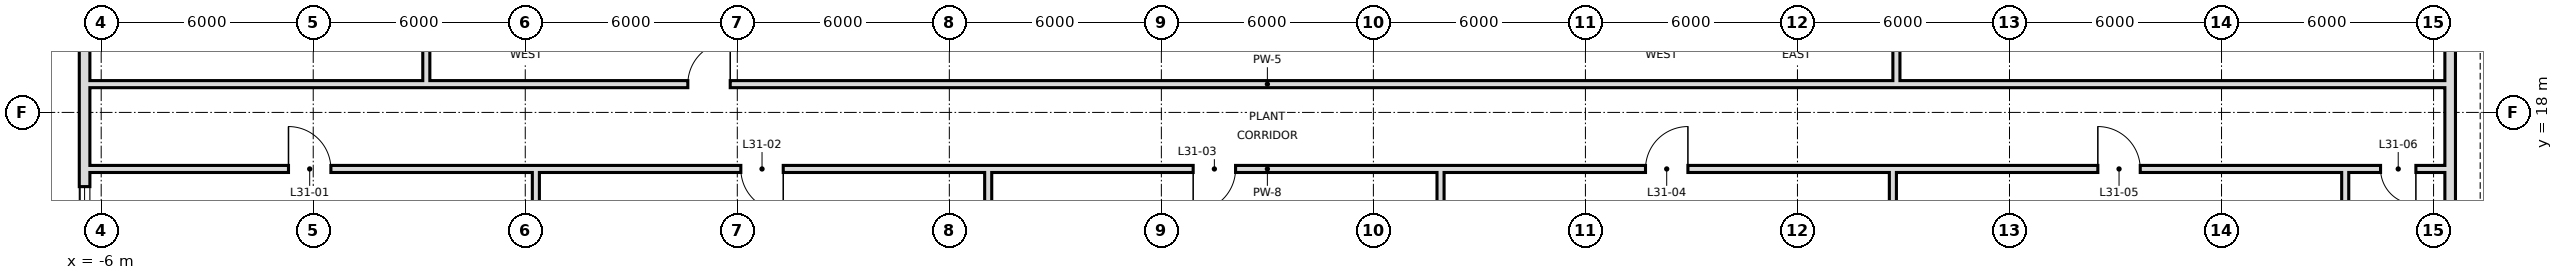
"""IFC4 building model, lengths in metres.
Left out: names, types, materials, properties, quantities, classifications, styles, units other than length and angle.
Written with IfcOpenShell. Run it as: python <this file> out.ifc"""

import sys

from ifc_helpers import new_model, si_unit, direction, frame, frame_2d, origin, place, context, subcontext, project, spatial, rectangle, extrude, element, fill, save


model = new_model("IFC4")
c1 = context("Model", 3, precision=1e-05, world=origin(), true_north=direction((0.0, 1.0)))
c2 = subcontext(c1, "Body", "Model", "MODEL_VIEW")
j1 = project(units=[si_unit("LENGTHUNIT", "METRE"), si_unit("PLANEANGLEUNIT", "RADIAN")], contexts=[c1])
p1 = place(None, origin())
s1 = spatial("IfcSite", under=j1, at=p1, CompositionType="ELEMENT")
p2 = place(p1, origin())
s2 = spatial("IfcBuilding", under=s1, at=p2, CompositionType="ELEMENT")
p3 = place(p2, frame((0.0, 0.0, 138.4)))
s3 = spatial("IfcBuildingStorey", under=s2, at=p3, CompositionType="ELEMENT", Elevation=138.4)
p4 = place(p3, frame((60.47, 5.805, 0.0), z_axis=(0.0, 0.0, 1.0), x_axis=(0.0, 1.0, 0.0)))
e1 = element("IfcWall", 1, at=p4, inside=s3, PredefinedType="SOLIDWALL", context=c2, shape_type="SweptSolid", body=[
    extrude(rectangle(XDim=36.389, YDim=0.3, at=frame_2d((18.195, 0.0))), origin(), (0.0, 0.0, 1.0), 5.22),
])
p5 = place(p4, frame((2.17, 0.0, 0.9)))
e2 = element("IfcOpeningElement", 2, at=p5, cuts=e1, PredefinedType="OPENING", context=c2, shape_type="SweptSolid", body=[
    extrude(rectangle(XDim=1.8, YDim=1.5, at=frame_2d((0.9, 0.75))), frame((0.0, 0.16, 0.0), z_axis=(0.0, -1.0, 0.0), x_axis=(1.0, 0.0, 0.0)), (0.0, 0.0, 1.0), 0.32),
])
p6 = place(p4, frame((14.295, 0.0, 0.9)))
e3 = element("IfcOpeningElement", 3, at=p6, cuts=e1, PredefinedType="OPENING", context=c2, shape_type="SweptSolid", body=[
    extrude(rectangle(XDim=1.8, YDim=1.5, at=frame_2d((0.9, 0.75))), frame((0.0, 0.16, 0.0), z_axis=(0.0, -1.0, 0.0), x_axis=(1.0, 0.0, 0.0)), (0.0, 0.0, 1.0), 0.32),
])
p7 = place(p4, frame((26.295, 0.0, 0.9)))
e4 = element("IfcOpeningElement", 4, at=p7, cuts=e1, PredefinedType="OPENING", context=c2, shape_type="SweptSolid", body=[
    extrude(rectangle(XDim=1.8, YDim=1.5, at=frame_2d((0.9, 0.75))), frame((0.0, 0.16, 0.0), z_axis=(0.0, -1.0, 0.0), x_axis=(1.0, 0.0, 0.0)), (0.0, 0.0, 1.0), 0.32),
])
p8 = place(p3, frame((-6.47, 42.195, 0.0), z_axis=(0.0, 0.0, 1.0), x_axis=(0.0, -1.0, 0.0)))
e5 = element("IfcWall", 5, at=p8, inside=s3, PredefinedType="SOLIDWALL", context=c2, shape_type="SweptSolid", body=[
    extrude(rectangle(XDim=36.389, YDim=0.3, at=frame_2d((18.195, 0.0))), origin(), (0.0, 0.0, 1.0), 5.22),
])
p9 = place(p8, frame((2.17, 0.0, 0.9)))
e6 = element("IfcOpeningElement", 6, at=p9, cuts=e5, PredefinedType="OPENING", context=c2, shape_type="SweptSolid", body=[
    extrude(rectangle(XDim=1.8, YDim=1.5, at=frame_2d((0.9, 0.75))), frame((0.0, 0.16, 0.0), z_axis=(0.0, -1.0, 0.0), x_axis=(1.0, 0.0, 0.0)), (0.0, 0.0, 1.0), 0.32),
])
p10 = place(p8, frame((14.295, 0.0, 0.9)))
e7 = element("IfcOpeningElement", 7, at=p10, cuts=e5, PredefinedType="OPENING", context=c2, shape_type="SweptSolid", body=[
    extrude(rectangle(XDim=1.8, YDim=1.5, at=frame_2d((0.9, 0.75))), frame((0.0, 0.16, 0.0), z_axis=(0.0, -1.0, 0.0), x_axis=(1.0, 0.0, 0.0)), (0.0, 0.0, 1.0), 0.32),
])
p11 = place(p8, frame((26.295, 0.0, 0.9)))
e8 = element("IfcOpeningElement", 8, at=p11, cuts=e5, PredefinedType="OPENING", context=c2, shape_type="SweptSolid", body=[
    extrude(rectangle(XDim=1.8, YDim=1.5, at=frame_2d((0.9, 0.75))), frame((0.0, 0.16, 0.0), z_axis=(0.0, -1.0, 0.0), x_axis=(1.0, 0.0, 0.0)), (0.0, 0.0, 1.0), 0.32),
])
p12 = place(p3, frame((3.2, 18.9, 0.0), z_axis=(0.0, 0.0, 1.0), x_axis=(0.0, 1.0, 0.0)))
e9 = element("IfcWall", 9, at=p12, inside=s3, PredefinedType="SOLIDWALL", context=c2, shape_type="SweptSolid", body=[
    extrude(rectangle(XDim=29.7, YDim=0.2, at=frame_2d((14.85, 0.0))), origin(), (0.0, 0.0, 1.0), 4.52),
])
p13 = place(p12, frame((18.3, 0.0, 0.0)))
e10 = element("IfcOpeningElement", 10, at=p13, cuts=e9, PredefinedType="OPENING", context=c2, shape_type="SweptSolid", body=[
    extrude(rectangle(XDim=1.2, YDim=2.4, at=frame_2d((0.6, 1.2))), frame((0.0, 0.11, 0.0), z_axis=(0.0, -1.0, 0.0), x_axis=(1.0, 0.0, 0.0)), (0.0, 0.0, 1.0), 0.22),
])
for number, where, z_axis, x_axis in (
    (11, (6.3, -0.6, 0.0), (0.0, 0.0, 1.0), (0.0, 1.0, 0.0)),
    (12, (19.1, -0.6, 0.0), (0.0, 0.0, 1.0), (0.0, 1.0, 0.0)),
    (13, (31.9, -0.6, 0.0), (0.0, 0.0, 1.0), (0.0, 1.0, 0.0)),
    (14, (44.7, -0.6, 0.0), (0.0, 0.0, 1.0), (0.0, 1.0, 0.0)),
):
    element("IfcWall", number, at=place(p3, frame(where, z_axis=z_axis, x_axis=x_axis)), inside=s3, PredefinedType="SOLIDWALL", context=c2, shape_type="SweptSolid", body=[
        extrude(rectangle(XDim=16.9, YDim=0.2, at=frame_2d((8.45, 0.0))), origin(), (0.0, 0.0, 1.0), 4.52),
    ])
p14 = place(p3, frame((44.8, 18.9, 0.0), z_axis=(0.0, 0.0, 1.0), x_axis=(0.0, 1.0, 0.0)))
e15 = element("IfcWall", 15, at=p14, inside=s3, PredefinedType="SOLIDWALL", context=c2, shape_type="SweptSolid", body=[
    extrude(rectangle(XDim=29.7, YDim=0.2, at=frame_2d((14.85, 0.0))), origin(), (0.0, 0.0, 1.0), 4.52),
])
p15 = place(p14, frame((18.3, 0.0, 0.0)))
e16 = element("IfcOpeningElement", 16, at=p15, cuts=e15, PredefinedType="OPENING", context=c2, shape_type="SweptSolid", body=[
    extrude(rectangle(XDim=1.2, YDim=2.4, at=frame_2d((0.6, 1.2))), frame((0.0, 0.11, 0.0), z_axis=(0.0, -1.0, 0.0), x_axis=(1.0, 0.0, 0.0)), (0.0, 0.0, 1.0), 0.22),
])
p16 = place(p3, frame((57.5, 2.651, 0.0), z_axis=(0.0, 0.0, 1.0), x_axis=(0.0, 1.0, 0.0)))
e17 = element("IfcWall", 17, at=p16, inside=s3, PredefinedType="SOLIDWALL", context=c2, shape_type="SweptSolid", body=[
    extrude(rectangle(XDim=13.649, YDim=0.2, at=frame_2d((6.825, 0.0))), origin(), (0.0, 0.0, 1.0), 4.52),
])
p17 = place(p3, frame((-6.6, 16.4, 0.0), z_axis=(0.0, 0.0, 1.0), x_axis=(1.0, 0.0, 0.0)))
e18 = element("IfcWall", 18, at=p17, inside=s3, PredefinedType="SOLIDWALL", context=c2, shape_type="SweptSolid", body=[
    extrude(rectangle(XDim=67.2, YDim=0.2, at=frame_2d((33.6, 0.0))), origin(), (0.0, 0.0, 1.0), 4.52),
])
p18 = place(p17, frame((5.9, 0.0, 0.0)))
e19 = element("IfcOpeningElement", 19, at=p18, cuts=e18, PredefinedType="OPENING", context=c2, shape_type="SweptSolid", body=[
    extrude(rectangle(XDim=1.2, YDim=2.4, at=frame_2d((0.6, 1.2))), frame((0.0, 0.11, 0.0), z_axis=(0.0, -1.0, 0.0), x_axis=(1.0, 0.0, 0.0)), (0.0, 0.0, 1.0), 0.22),
])
p19 = place(p17, frame((18.7, 0.0, 0.0)))
e20 = element("IfcOpeningElement", 20, at=p19, cuts=e18, PredefinedType="OPENING", context=c2, shape_type="SweptSolid", body=[
    extrude(rectangle(XDim=1.2, YDim=2.4, at=frame_2d((0.6, 1.2))), frame((0.0, 0.11, 0.0), z_axis=(0.0, -1.0, 0.0), x_axis=(1.0, 0.0, 0.0)), (0.0, 0.0, 1.0), 0.22),
])
p20 = place(p17, frame((31.5, 0.0, 0.0)))
e21 = element("IfcOpeningElement", 21, at=p20, cuts=e18, PredefinedType="OPENING", context=c2, shape_type="SweptSolid", body=[
    extrude(rectangle(XDim=1.2, YDim=2.4, at=frame_2d((0.6, 1.2))), frame((0.0, 0.11, 0.0), z_axis=(0.0, -1.0, 0.0), x_axis=(1.0, 0.0, 0.0)), (0.0, 0.0, 1.0), 0.22),
])
p21 = place(p17, frame((44.3, 0.0, 0.0)))
e22 = element("IfcOpeningElement", 22, at=p21, cuts=e18, PredefinedType="OPENING", context=c2, shape_type="SweptSolid", body=[
    extrude(rectangle(XDim=1.2, YDim=2.4, at=frame_2d((0.6, 1.2))), frame((0.0, 0.11, 0.0), z_axis=(0.0, -1.0, 0.0), x_axis=(1.0, 0.0, 0.0)), (0.0, 0.0, 1.0), 0.22),
])
p22 = place(p17, frame((57.1, 0.0, 0.0)))
e23 = element("IfcOpeningElement", 23, at=p22, cuts=e18, PredefinedType="OPENING", context=c2, shape_type="SweptSolid", body=[
    extrude(rectangle(XDim=1.2, YDim=2.4, at=frame_2d((0.6, 1.2))), frame((0.0, 0.11, 0.0), z_axis=(0.0, -1.0, 0.0), x_axis=(1.0, 0.0, 0.0)), (0.0, 0.0, 1.0), 0.22),
])
p23 = place(p17, frame((65.1, 0.0, 0.0)))
e24 = element("IfcOpeningElement", 24, at=p23, cuts=e18, PredefinedType="OPENING", context=c2, shape_type="SweptSolid", body=[
    extrude(rectangle(XDim=1.0, YDim=2.4, at=frame_2d((0.5, 1.2))), frame((0.0, 0.11, 0.0), z_axis=(0.0, -1.0, 0.0), x_axis=(1.0, 0.0, 0.0)), (0.0, 0.0, 1.0), 0.22),
])
p24 = place(p3, frame((-6.6, 18.8, 0.0), z_axis=(0.0, 0.0, 1.0), x_axis=(1.0, 0.0, 0.0)))
e25 = element("IfcWall", 25, at=p24, inside=s3, PredefinedType="SOLIDWALL", context=c2, shape_type="SweptSolid", body=[
    extrude(rectangle(XDim=67.2, YDim=0.2, at=frame_2d((33.6, 0.0))), origin(), (0.0, 0.0, 1.0), 4.52),
])
p25 = place(p24, frame((17.2, 0.0, 0.0)))
e26 = element("IfcOpeningElement", 26, at=p25, cuts=e25, PredefinedType="OPENING", context=c2, shape_type="SweptSolid", body=[
    extrude(rectangle(XDim=1.2, YDim=2.4, at=frame_2d((0.6, 1.2))), frame((0.0, 0.11, 0.0), z_axis=(0.0, -1.0, 0.0), x_axis=(1.0, 0.0, 0.0)), (0.0, 0.0, 1.0), 0.22),
])
p26 = place(p11, origin())
e27 = element("IfcWindow", 27, at=p26, inside=s3, PartitioningType="SINGLE_PANEL", PredefinedType="WINDOW", context=c2, shape_type="SweptSolid", body=[
    extrude(rectangle(XDim=1.8, YDim=1.5, at=frame_2d((0.9, 0.75))), frame((0.0, 0.03, 0.0), z_axis=(0.0, -1.0, 0.0), x_axis=(1.0, 0.0, 0.0)), (0.0, 0.0, 1.0), 0.06),
])
fill(e8, e27)
p27 = place(p18, origin())
e28 = element("IfcDoor", 28, at=p27, inside=s3, OperationType="SINGLE_SWING_LEFT", PredefinedType="DOOR", context=c2, shape_type="SweptSolid", body=[
    extrude(rectangle(XDim=1.2, YDim=2.4, at=frame_2d((0.6, 1.2))), frame((0.0, 0.025, 0.0), z_axis=(0.0, -1.0, 0.0), x_axis=(1.0, 0.0, 0.0)), (0.0, 0.0, 1.0), 0.05),
])
fill(e19, e28)
p28 = place(p19, origin())
e29 = element("IfcDoor", 29, at=p28, inside=s3, OperationType="SINGLE_SWING_RIGHT", PredefinedType="DOOR", context=c2, shape_type="SweptSolid", body=[
    extrude(rectangle(XDim=1.2, YDim=2.4, at=frame_2d((0.6, 1.2))), frame((0.0, 0.025, 0.0), z_axis=(0.0, -1.0, 0.0), x_axis=(1.0, 0.0, 0.0)), (0.0, 0.0, 1.0), 0.05),
])
fill(e20, e29)
p29 = place(p20, frame((1.2, 0.0, 0.0), z_axis=(0.0, 0.0, 1.0), x_axis=(-1.0, 0.0, 0.0)))
e30 = element("IfcDoor", 30, at=p29, inside=s3, OperationType="SINGLE_SWING_RIGHT", PredefinedType="DOOR", context=c2, shape_type="SweptSolid", body=[
    extrude(rectangle(XDim=1.2, YDim=2.4, at=frame_2d((0.6, 1.2))), frame((0.0, 0.025, 0.0), z_axis=(0.0, -1.0, 0.0), x_axis=(1.0, 0.0, 0.0)), (0.0, 0.0, 1.0), 0.05),
])
fill(e21, e30)
p30 = place(p21, frame((1.2, 0.0, 0.0), z_axis=(0.0, 0.0, 1.0), x_axis=(-1.0, 0.0, 0.0)))
e31 = element("IfcDoor", 31, at=p30, inside=s3, OperationType="SINGLE_SWING_LEFT", PredefinedType="DOOR", context=c2, shape_type="SweptSolid", body=[
    extrude(rectangle(XDim=1.2, YDim=2.4, at=frame_2d((0.6, 1.2))), frame((0.0, 0.025, 0.0), z_axis=(0.0, -1.0, 0.0), x_axis=(1.0, 0.0, 0.0)), (0.0, 0.0, 1.0), 0.05),
])
fill(e22, e31)
p31 = place(p22, origin())
e32 = element("IfcDoor", 32, at=p31, inside=s3, OperationType="SINGLE_SWING_LEFT", PredefinedType="DOOR", context=c2, shape_type="SweptSolid", body=[
    extrude(rectangle(XDim=1.2, YDim=2.4, at=frame_2d((0.6, 1.2))), frame((0.0, 0.025, 0.0), z_axis=(0.0, -1.0, 0.0), x_axis=(1.0, 0.0, 0.0)), (0.0, 0.0, 1.0), 0.05),
])
fill(e23, e32)
p32 = place(p23, origin())
e33 = element("IfcDoor", 33, at=p32, inside=s3, OperationType="SINGLE_SWING_RIGHT", PredefinedType="DOOR", context=c2, shape_type="SweptSolid", body=[
    extrude(rectangle(XDim=1.0, YDim=2.4, at=frame_2d((0.5, 1.2))), frame((0.0, 0.025, 0.0), z_axis=(0.0, -1.0, 0.0), x_axis=(1.0, 0.0, 0.0)), (0.0, 0.0, 1.0), 0.05),
])
fill(e24, e33)
p33 = place(p25, frame((1.2, 0.0, 0.0), z_axis=(0.0, 0.0, 1.0), x_axis=(-1.0, 0.0, 0.0)))
e34 = element("IfcDoor", 34, at=p33, inside=s3, OperationType="SINGLE_SWING_LEFT", PredefinedType="DOOR", context=c2, shape_type="SweptSolid", body=[
    extrude(rectangle(XDim=1.2, YDim=2.4, at=frame_2d((0.6, 1.2))), frame((0.0, 0.025, 0.0), z_axis=(0.0, -1.0, 0.0), x_axis=(1.0, 0.0, 0.0)), (0.0, 0.0, 1.0), 0.05),
])
fill(e26, e34)
save(model, sys.argv[1])
